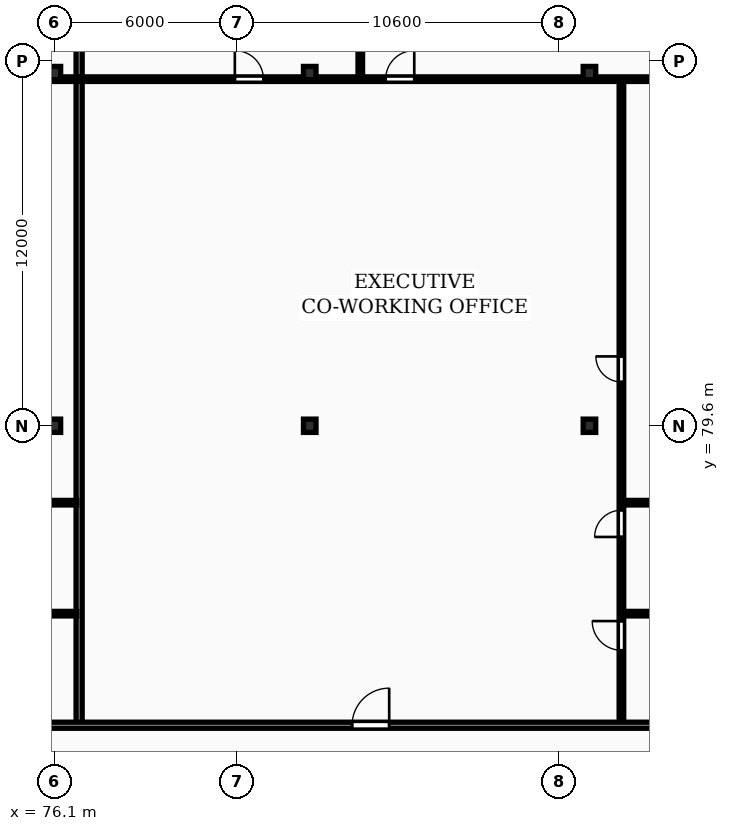
"""IFC4 building model, lengths in metres.
Left out: names, types, materials, properties, quantities, classifications, styles, units other than length and angle.
Written with IfcOpenShell. Run it as: python <this file> out.ifc"""

import sys

from ifc_helpers import new_model, si_unit, direction, frame, frame_2d, origin, origin_2d, place, context, subcontext, project, spatial, rectangle, i_section, extrude, element, fill, save


model = new_model("IFC4")
c1 = context("Model", 3, precision=1e-05, world=origin(), true_north=direction((0.0, 1.0)))
c2 = subcontext(c1, "Body", "Model", "MODEL_VIEW")
j1 = project(units=[si_unit("LENGTHUNIT", "METRE"), si_unit("PLANEANGLEUNIT", "RADIAN")], contexts=[c1])
p1 = place(None, origin())
s1 = spatial("IfcSite", under=j1, at=p1, CompositionType="ELEMENT")
p2 = place(p1, origin())
s2 = spatial("IfcBuilding", under=s1, at=p2, CompositionType="ELEMENT")
p3 = place(p2, frame((0.0, 0.0, 139.3)))
s3 = spatial("IfcBuildingStorey", under=s2, at=p3, CompositionType="ELEMENT", Elevation=139.3)
for number, where, z_axis, x_axis in (
    (1, (76.1, 79.6, 0.0), (0.0, 0.0, 1.0), (1.0, 0.0, 0.0)),
    (2, (76.1, 91.2, 0.0), (0.0, 0.0, 1.0), (1.0, 0.0, 0.0)),
    (3, (84.5, 79.6, 0.0), (0.0, 0.0, 1.0), (1.0, 0.0, 0.0)),
    (4, (84.5, 91.2, 0.0), (0.0, 0.0, 1.0), (1.0, 0.0, 0.0)),
    (5, (93.7, 79.6, 0.0), (0.0, 0.0, 1.0), (1.0, 0.0, 0.0)),
    (6, (93.7, 91.2, 0.0), (0.0, 0.0, 1.0), (1.0, 0.0, 0.0)),
):
    element("IfcColumn", number, at=place(p3, frame(where, z_axis=z_axis, x_axis=x_axis)), inside=s3, PredefinedType="COLUMN", context=c2, shape_type="SweptSolid", body=[
        extrude(i_section(OverallWidth=0.412, OverallDepth=0.437, WebThickness=0.036, FlangeThickness=0.052, FilletRadius=0.015, at=origin_2d()), origin(), (0.0, 0.0, 1.0), 3.6),
    ])
p4 = place(p3, frame((76.914, 69.83, 0.0), z_axis=(0.0, 0.0, 1.0), x_axis=(0.0, 1.0, 0.0)))
e7 = element("IfcWall", 7, at=p4, inside=s3, PredefinedType="PARTITIONING", context=c2, shape_type="SweptSolid", body=[
    extrude(rectangle(XDim=26.07, YDim=0.2, at=frame_2d((13.035, 0.0))), origin(), (0.0, 0.0, 1.0), 3.31),
])
for number, where, z_axis, x_axis in (
    (8, (73.474, 73.42, 0.0), (0.0, 0.0, 1.0), (1.0, 0.0, 0.0)),
    (9, (73.474, 77.07, 0.0), (0.0, 0.0, 1.0), (1.0, 0.0, 0.0)),
):
    element("IfcWall", number, at=place(p3, frame(where, z_axis=z_axis, x_axis=x_axis)), inside=s3, PredefinedType="PARTITIONING", context=c2, shape_type="SweptSolid", body=[
        extrude(rectangle(XDim=3.36, YDim=0.15, at=frame_2d((1.68, 0.0))), origin(), (0.0, 0.0, 1.0), 3.31),
    ])
p5 = place(p3, frame((57.68, 91.0, 0.0), z_axis=(0.0, 0.0, 1.0), x_axis=(1.0, 0.0, 0.0)))
e10 = element("IfcWall", 10, at=p5, inside=s3, PredefinedType="PARTITIONING", context=c2, shape_type="SweptSolid", body=[
    extrude(rectangle(XDim=19.154, YDim=0.15, at=frame_2d((9.577, 0.0))), origin(), (0.0, 0.0, 1.0), 3.003),
])
p6 = place(p5, frame((6.967, 0.0, 0.0)))
e11 = element("IfcOpeningElement", 11, at=p6, cuts=e10, PredefinedType="OPENING", context=c2, shape_type="SweptSolid", body=[
    extrude(rectangle(XDim=0.94, YDim=2.1, at=frame_2d((0.47, 1.05))), frame((0.0, 0.085, 0.0), z_axis=(0.0, -1.0, 0.0), x_axis=(1.0, 0.0, 0.0)), (0.0, 0.0, 1.0), 0.17),
])
p7 = place(p5, frame((11.721, 0.0, 0.0)))
e12 = element("IfcOpeningElement", 12, at=p7, cuts=e10, PredefinedType="OPENING", context=c2, shape_type="SweptSolid", body=[
    extrude(rectangle(XDim=0.94, YDim=2.1, at=frame_2d((0.47, 1.05))), frame((0.0, 0.085, 0.0), z_axis=(0.0, -1.0, 0.0), x_axis=(1.0, 0.0, 0.0)), (0.0, 0.0, 1.0), 0.17),
])
for number, where, z_axis, x_axis in (
    (13, (94.811, 73.42, 0.0), (0.0, 0.0, 1.0), (1.0, 0.0, 0.0)),
    (14, (94.811, 77.07, 0.0), (0.0, 0.0, 1.0), (1.0, 0.0, 0.0)),
):
    element("IfcWall", number, at=place(p3, frame(where, z_axis=z_axis, x_axis=x_axis)), inside=s3, PredefinedType="PARTITIONING", context=c2, shape_type="SweptSolid", body=[
        extrude(rectangle(XDim=3.13, YDim=0.15, at=frame_2d((1.565, 0.0))), origin(), (0.0, 0.0, 1.0), 3.31),
    ])
p8 = place(p3, frame((94.751, 69.81, 0.0), z_axis=(0.0, 0.0, 1.0), x_axis=(0.0, 1.0, 0.0)))
e15 = element("IfcWall", 15, at=p8, inside=s3, PredefinedType="PARTITIONING", context=c2, shape_type="SweptSolid", body=[
    extrude(rectangle(XDim=21.13, YDim=0.15, at=frame_2d((10.565, 0.0))), origin(), (0.0, 0.0, 1.0), 3.31),
])
p9 = place(p8, frame((2.406, 0.0, 0.0)))
e16 = element("IfcOpeningElement", 16, at=p9, cuts=e15, PredefinedType="OPENING", context=c2, shape_type="SweptSolid", body=[
    extrude(rectangle(XDim=0.96, YDim=2.1, at=frame_2d((0.48, 1.05))), frame((0.0, 0.085, 0.0), z_axis=(0.0, -1.0, 0.0), x_axis=(1.0, 0.0, 0.0)), (0.0, 0.0, 1.0), 0.17),
])
p10 = place(p8, frame((6.133, 0.0, 0.0)))
e17 = element("IfcOpeningElement", 17, at=p10, cuts=e15, PredefinedType="OPENING", context=c2, shape_type="SweptSolid", body=[
    extrude(rectangle(XDim=0.88, YDim=2.06, at=frame_2d((0.44, 1.03))), frame((0.0, 0.085, 0.0), z_axis=(0.0, -1.0, 0.0), x_axis=(1.0, 0.0, 0.0)), (0.0, 0.0, 1.0), 0.17),
])
p11 = place(p8, frame((11.231, 0.0, 0.0)))
e18 = element("IfcOpeningElement", 18, at=p11, cuts=e15, PredefinedType="OPENING", context=c2, shape_type="SweptSolid", body=[
    extrude(rectangle(XDim=0.84, YDim=2.04, at=frame_2d((0.42, 1.02))), frame((0.0, 0.085, 0.0), z_axis=(0.0, -1.0, 0.0), x_axis=(1.0, 0.0, 0.0)), (0.0, 0.0, 1.0), 0.17),
])
p12 = place(p3, frame((86.163, 91.08, 0.0), z_axis=(0.0, 0.0, 1.0), x_axis=(0.0, 1.0, 0.0)))
e19 = element("IfcWall", 19, at=p12, inside=s3, PredefinedType="PARTITIONING", context=c2, shape_type="SweptSolid", body=[
    extrude(rectangle(XDim=4.82, YDim=0.15, at=frame_2d((2.41, 0.0))), origin(), (0.0, 0.0, 1.0), 3.31),
])
p13 = place(p3, frame((76.994, 91.0, 0.0), z_axis=(0.0, 0.0, 1.0), x_axis=(1.0, 0.0, 0.0)))
e20 = element("IfcWall", 20, at=p13, inside=s3, PredefinedType="PARTITIONING", context=c2, shape_type="SweptSolid", body=[
    extrude(rectangle(XDim=20.947, YDim=0.15, at=frame_2d((10.474, 0.0))), origin(), (0.0, 0.0, 1.0), 3.003),
])
p14 = place(p13, frame((5.042, 0.0, 0.0)))
e21 = element("IfcOpeningElement", 21, at=p14, cuts=e20, PredefinedType="OPENING", context=c2, shape_type="SweptSolid", body=[
    extrude(rectangle(XDim=0.94, YDim=2.1, at=frame_2d((0.47, 1.05))), frame((0.0, 0.085, 0.0), z_axis=(0.0, -1.0, 0.0), x_axis=(1.0, 0.0, 0.0)), (0.0, 0.0, 1.0), 0.17),
])
p15 = place(p13, frame((10.004, 0.0, 0.0)))
e22 = element("IfcOpeningElement", 22, at=p15, cuts=e20, PredefinedType="OPENING", context=c2, shape_type="SweptSolid", body=[
    extrude(rectangle(XDim=0.94, YDim=2.1, at=frame_2d((0.47, 1.05))), frame((0.0, 0.085, 0.0), z_axis=(0.0, -1.0, 0.0), x_axis=(1.0, 0.0, 0.0)), (0.0, 0.0, 1.0), 0.17),
])
p16 = place(p3, frame((57.6, 69.75, 0.0), z_axis=(0.0, 0.0, 1.0), x_axis=(1.0, 0.0, 0.0)))
e23 = element("IfcWall", 23, at=p16, inside=s3, PredefinedType="PARTITIONING", context=c2, shape_type="SweptSolid", body=[
    extrude(rectangle(XDim=73.0, YDim=0.2, at=frame_2d((36.5, 0.0))), origin(), (0.0, 0.0, 1.0), 3.31),
])
p17 = place(p16, frame((7.967, 0.0, 0.0)))
e24 = element("IfcOpeningElement", 24, at=p17, cuts=e23, PredefinedType="OPENING", context=c2, shape_type="SweptSolid", body=[
    extrude(rectangle(XDim=1.22, YDim=2.18, at=frame_2d((0.61, 1.09))), frame((0.0, 0.11, 0.0), z_axis=(0.0, -1.0, 0.0), x_axis=(1.0, 0.0, 0.0)), (0.0, 0.0, 1.0), 0.22),
])
p18 = place(p16, frame((28.293, 0.0, 0.0)))
e25 = element("IfcOpeningElement", 25, at=p18, cuts=e23, PredefinedType="OPENING", context=c2, shape_type="SweptSolid", body=[
    extrude(rectangle(XDim=1.22, YDim=2.18, at=frame_2d((0.61, 1.09))), frame((0.0, 0.11, 0.0), z_axis=(0.0, -1.0, 0.0), x_axis=(1.0, 0.0, 0.0)), (0.0, 0.0, 1.0), 0.22),
])
p19 = place(p16, frame((42.466, 0.0, 0.0)))
e26 = element("IfcOpeningElement", 26, at=p19, cuts=e23, PredefinedType="OPENING", context=c2, shape_type="SweptSolid", body=[
    extrude(rectangle(XDim=0.95, YDim=2.15, at=frame_2d((0.475, 1.075))), frame((0.0, 0.11, 0.0), z_axis=(0.0, -1.0, 0.0), x_axis=(1.0, 0.0, 0.0)), (0.0, 0.0, 1.0), 0.22),
])
p20 = place(p16, frame((60.738, 0.0, 0.0)))
e27 = element("IfcOpeningElement", 27, at=p20, cuts=e23, PredefinedType="OPENING", context=c2, shape_type="SweptSolid", body=[
    extrude(rectangle(XDim=0.95, YDim=2.15, at=frame_2d((0.475, 1.075))), frame((0.0, 0.11, 0.0), z_axis=(0.0, -1.0, 0.0), x_axis=(1.0, 0.0, 0.0)), (0.0, 0.0, 1.0), 0.22),
])
p21 = place(p9, origin())
e28 = element("IfcDoor", 28, at=p21, inside=s3, OperationType="SINGLE_SWING_RIGHT", PredefinedType="DOOR", context=c2, shape_type="SweptSolid", body=[
    extrude(rectangle(XDim=0.96, YDim=2.1, at=frame_2d((0.48, 1.05))), frame((0.0, 0.025, 0.0), z_axis=(0.0, -1.0, 0.0), x_axis=(1.0, 0.0, 0.0)), (0.0, 0.0, 1.0), 0.05),
])
fill(e16, e28)
p22 = place(p10, origin())
e29 = element("IfcDoor", 29, at=p22, inside=s3, OperationType="SINGLE_SWING_LEFT", PredefinedType="DOOR", context=c2, shape_type="SweptSolid", body=[
    extrude(rectangle(XDim=0.88, YDim=2.06, at=frame_2d((0.44, 1.03))), frame((0.0, 0.025, 0.0), z_axis=(0.0, -1.0, 0.0), x_axis=(1.0, 0.0, 0.0)), (0.0, 0.0, 1.0), 0.05),
])
fill(e17, e29)
p23 = place(p11, origin())
e30 = element("IfcDoor", 30, at=p23, inside=s3, OperationType="SINGLE_SWING_RIGHT", PredefinedType="DOOR", context=c2, shape_type="SweptSolid", body=[
    extrude(rectangle(XDim=0.84, YDim=2.04, at=frame_2d((0.42, 1.02))), frame((0.0, 0.025, 0.0), z_axis=(0.0, -1.0, 0.0), x_axis=(1.0, 0.0, 0.0)), (0.0, 0.0, 1.0), 0.05),
])
fill(e18, e30)
p24 = place(p14, origin())
e31 = element("IfcDoor", 31, at=p24, inside=s3, OperationType="SINGLE_SWING_LEFT", PredefinedType="DOOR", context=c2, shape_type="SweptSolid", body=[
    extrude(rectangle(XDim=0.94, YDim=2.1, at=frame_2d((0.47, 1.05))), frame((0.0, 0.025, 0.0), z_axis=(0.0, -1.0, 0.0), x_axis=(1.0, 0.0, 0.0)), (0.0, 0.0, 1.0), 0.05),
])
fill(e21, e31)
p25 = place(p15, origin())
e32 = element("IfcDoor", 32, at=p25, inside=s3, OperationType="SINGLE_SWING_RIGHT", PredefinedType="DOOR", context=c2, shape_type="SweptSolid", body=[
    extrude(rectangle(XDim=0.94, YDim=2.1, at=frame_2d((0.47, 1.05))), frame((0.0, 0.025, 0.0), z_axis=(0.0, -1.0, 0.0), x_axis=(1.0, 0.0, 0.0)), (0.0, 0.0, 1.0), 0.05),
])
fill(e22, e32)
p26 = place(p18, origin())
e33 = element("IfcDoor", 33, at=p26, inside=s3, OperationType="SINGLE_SWING_RIGHT", PredefinedType="DOOR", context=c2, shape_type="SweptSolid", body=[
    extrude(rectangle(XDim=1.22, YDim=2.18, at=frame_2d((0.61, 1.09))), frame((0.0, 0.025, 0.0), z_axis=(0.0, -1.0, 0.0), x_axis=(1.0, 0.0, 0.0)), (0.0, 0.0, 1.0), 0.05),
])
fill(e25, e33)
save(model, sys.argv[1])
